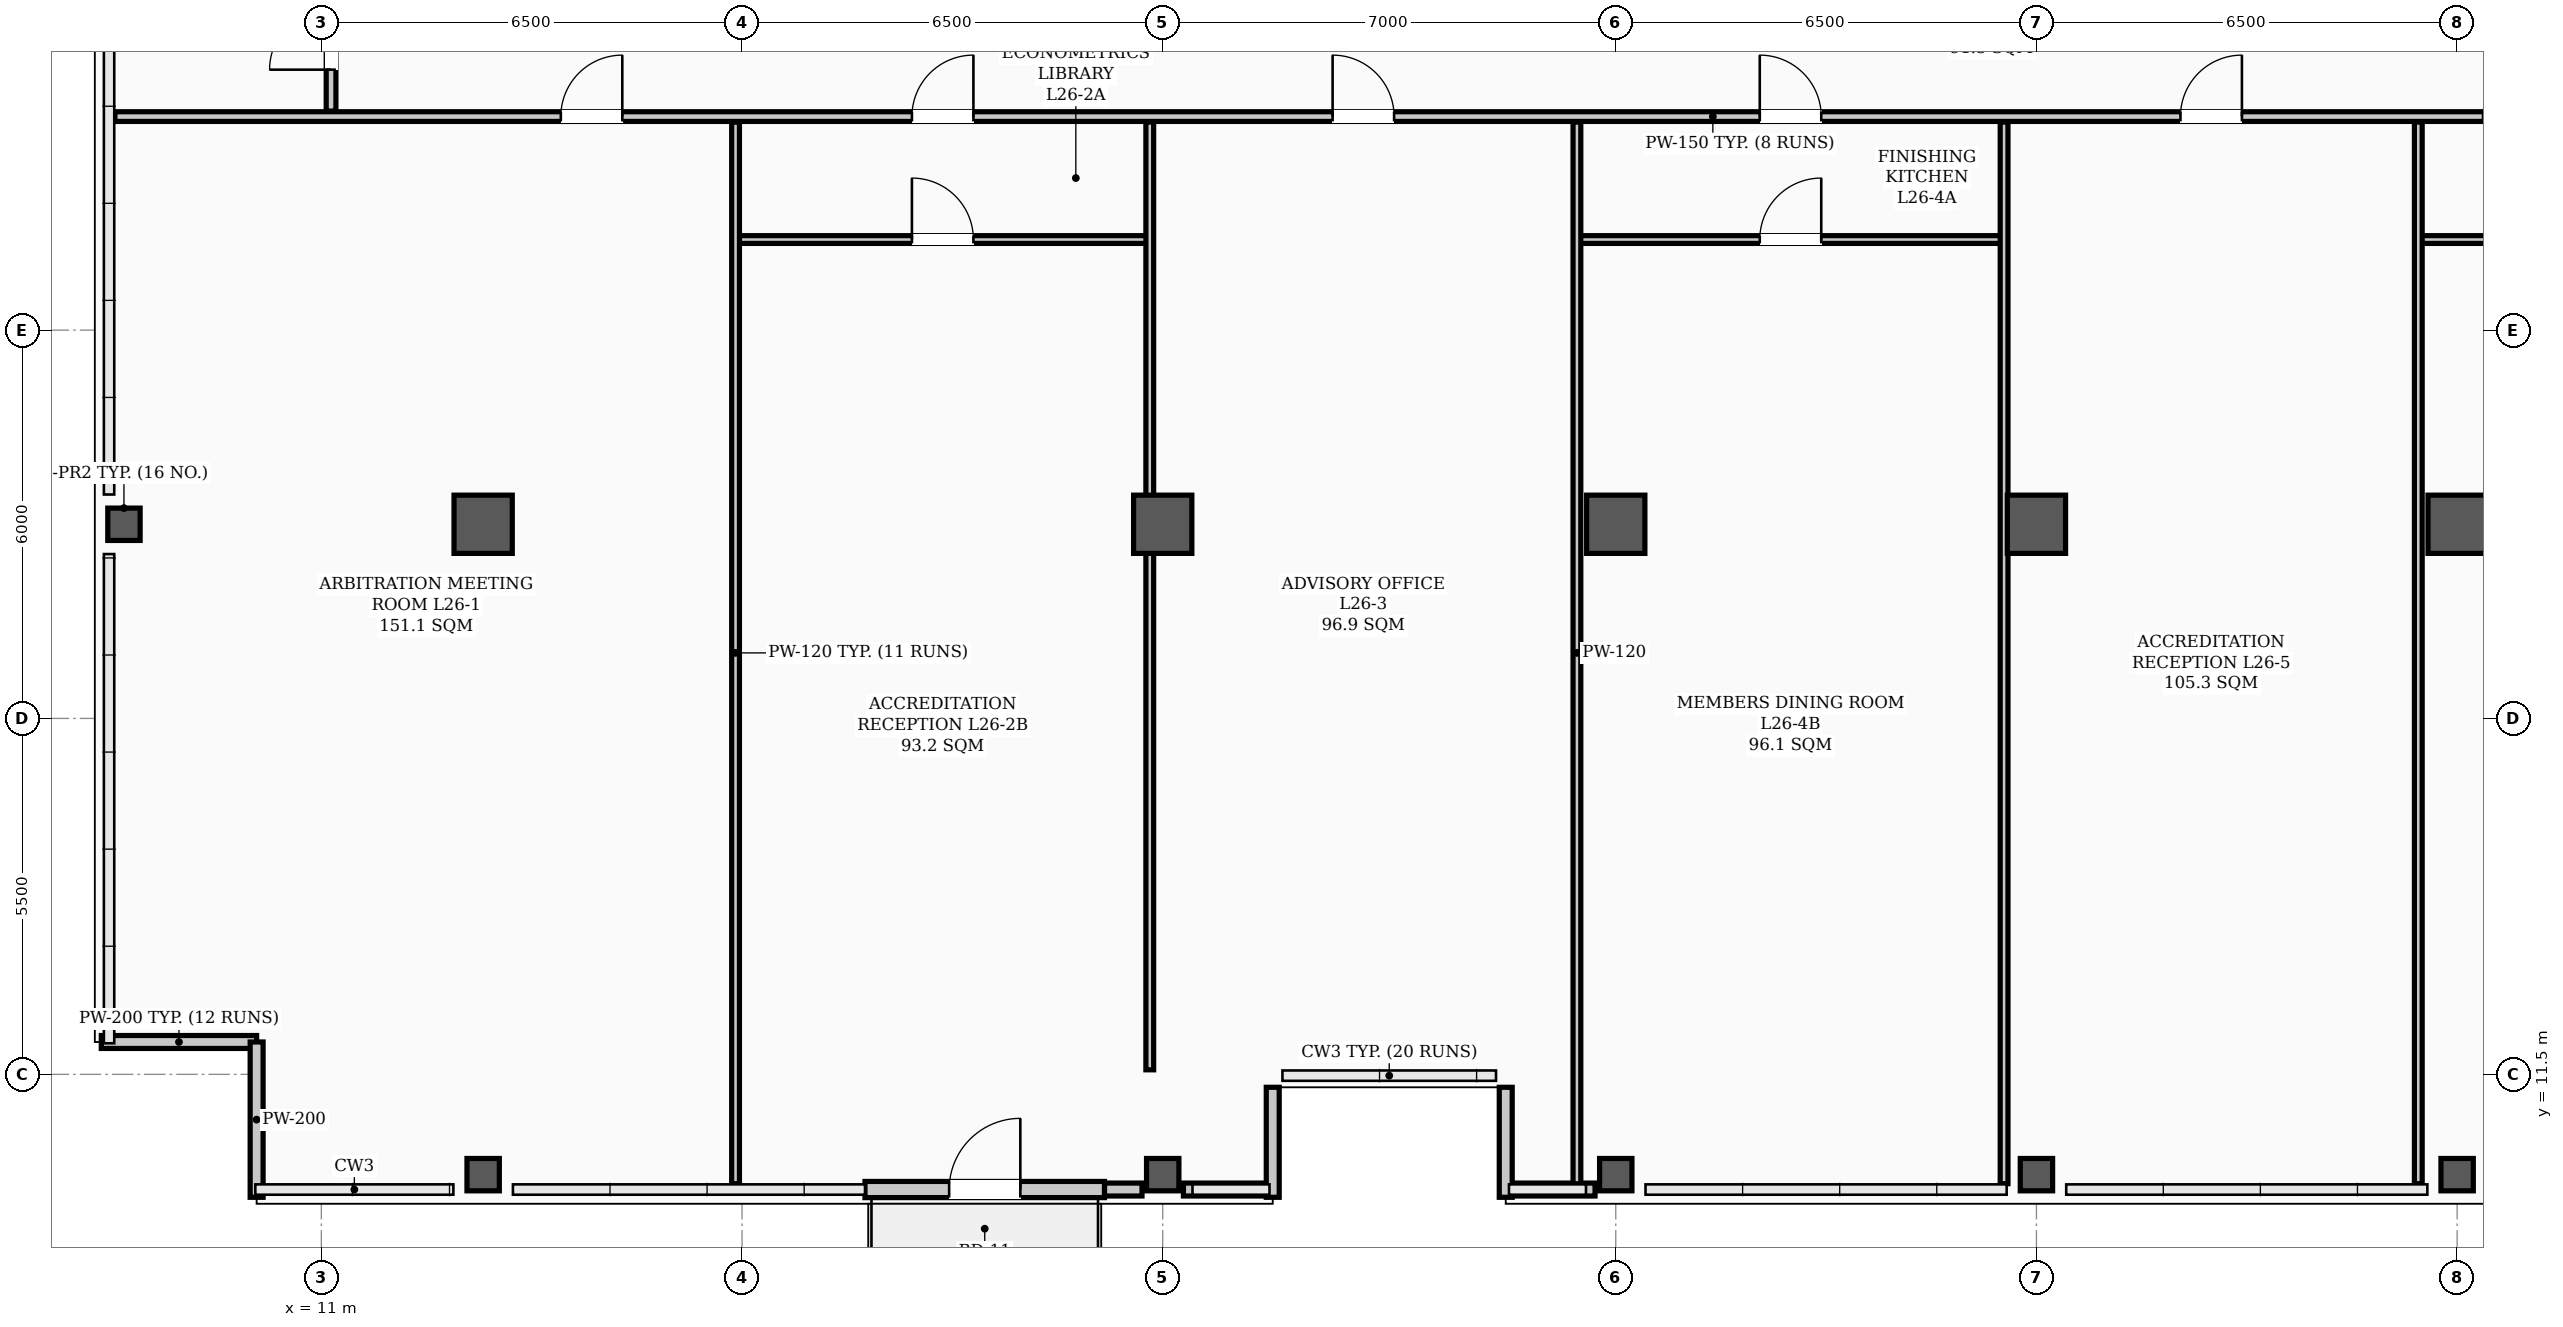
"""IFC4 building model, lengths in metres.
Left out: names, types, materials, properties, quantities, classifications, styles, units other than length and angle.
Written with IfcOpenShell. Run it as: python <this file> out.ifc"""

import sys

from ifc_helpers import new_model, si_unit, direction, frame, frame_2d, origin, origin_2d, place, context, subcontext, project, spatial, rectangle, hollow_rectangle, extrude, element, fill, save


model = new_model("IFC4")
c1 = context("Model", 3, precision=1e-05, world=origin(), true_north=direction((0.0, 1.0)))
c2 = subcontext(c1, "Body", "Model", "MODEL_VIEW")
j1 = project(units=[si_unit("LENGTHUNIT", "METRE"), si_unit("PLANEANGLEUNIT", "RADIAN")], contexts=[c1])
p1 = place(None, origin())
s1 = spatial("IfcSite", under=j1, at=p1, CompositionType="ELEMENT")
p2 = place(p1, origin())
s2 = spatial("IfcBuilding", under=s1, at=p2, CompositionType="ELEMENT")
p3 = place(p2, frame((0.0, 0.0, 106.0)))
s3 = spatial("IfcBuildingStorey", under=s2, at=p3, CompositionType="ELEMENT", Elevation=106.0)
for number, where, z_axis, x_axis in (
    (1, (13.5, 20.0, 0.0), (0.0, 0.0, 1.0), (1.0, 0.0, 0.0)),
    (2, (24.0, 20.0, 0.0), (0.0, 0.0, 1.0), (1.0, 0.0, 0.0)),
    (3, (31.0, 20.0, 0.0), (0.0, 0.0, 1.0), (1.0, 0.0, 0.0)),
    (4, (37.5, 20.0, 0.0), (0.0, 0.0, 1.0), (1.0, 0.0, 0.0)),
    (5, (44.0, 20.0, 0.0), (0.0, 0.0, 1.0), (1.0, 0.0, 0.0)),
):
    element("IfcColumn", number, at=place(p3, frame(where, z_axis=z_axis, x_axis=x_axis)), inside=s3, PredefinedType="COLUMN", context=c2, shape_type="SweptSolid", body=[
        extrude(hollow_rectangle(XDim=0.9, YDim=0.9, WallThickness=0.035, InnerFilletRadius=0.017, OuterFilletRadius=0.052, at=origin_2d()), origin(), (0.0, 0.0, 1.0), 5.0),
    ])
for number, where, z_axis, x_axis in (
    (6, (7.95, 20.0, 0.0), (0.0, 0.0, 1.0), (1.0, 0.0, 0.0)),
    (7, (13.5, 9.95, 0.0), (0.0, 0.0, 1.0), (1.0, 0.0, 0.0)),
    (8, (24.0, 9.95, 0.0), (0.0, 0.0, 1.0), (1.0, 0.0, 0.0)),
    (9, (31.0, 9.95, 0.0), (0.0, 0.0, 1.0), (1.0, 0.0, 0.0)),
    (10, (37.5, 9.95, 0.0), (0.0, 0.0, 1.0), (1.0, 0.0, 0.0)),
    (11, (44.0, 9.95, 0.0), (0.0, 0.0, 1.0), (1.0, 0.0, 0.0)),
):
    element("IfcColumn", number, at=place(p3, frame(where, z_axis=z_axis, x_axis=x_axis)), inside=s3, PredefinedType="COLUMN", context=c2, shape_type="SweptSolid", body=[
        extrude(hollow_rectangle(XDim=0.5, YDim=0.5, WallThickness=0.024, InnerFilletRadius=0.012, OuterFilletRadius=0.036, at=origin_2d()), origin(), (0.0, 0.0, 1.0), 5.0),
    ])
p4 = place(p3, frame((23.1, 9.72, 0.0), z_axis=(0.0, 0.0, 1.0), x_axis=(1.0, 0.0, 0.0)))
e12 = element("IfcWall", 12, at=p4, inside=s3, PredefinedType="PARAPET", context=c2, shape_type="SweptSolid", body=[
    extrude(rectangle(XDim=0.58, YDim=0.2, at=frame_2d((0.29, 0.0))), origin(), (0.0, 0.0, 1.0), 1.2),
])
for number, where, z_axis, x_axis in (
    (13, (24.32, 9.72, 0.0), (0.0, 0.0, 1.0), (1.0, 0.0, 0.0)),
    (14, (29.35, 9.72, 0.0), (0.0, 0.0, 1.0), (1.0, 0.0, 0.0)),
):
    element("IfcWall", number, at=place(p3, frame(where, z_axis=z_axis, x_axis=x_axis)), inside=s3, PredefinedType="PARAPET", context=c2, shape_type="SweptSolid", body=[
        extrude(rectangle(XDim=1.33, YDim=0.2, at=frame_2d((0.665, 0.0))), origin(), (0.0, 0.0, 1.0), 1.2),
    ])
for number, where, z_axis, x_axis in (
    (15, (7.6, 12.0, 0.0), (0.0, 0.0, 1.0), (1.0, 0.0, 0.0)),
    (16, (10.0, 12.0, 0.0), (0.0, 0.0, 1.0), (0.0, -1.0, 0.0)),
):
    element("IfcWall", number, at=place(p3, frame(where, z_axis=z_axis, x_axis=x_axis)), inside=s3, PredefinedType="PARAPET", context=c2, shape_type="SweptSolid", body=[
        extrude(rectangle(XDim=2.4, YDim=0.2, at=frame_2d((1.2, 0.0))), origin(), (0.0, 0.0, 1.0), 1.2),
    ])
for number, where, z_axis, x_axis in (
    (17, (25.7, 9.6, 0.0), (0.0, 0.0, 1.0), (0.0, 1.0, 0.0)),
    (18, (29.3, 11.3, 0.0), (0.0, 0.0, 1.0), (0.0, -1.0, 0.0)),
):
    element("IfcWall", number, at=place(p3, frame(where, z_axis=z_axis, x_axis=x_axis)), inside=s3, PredefinedType="PARAPET", context=c2, shape_type="SweptSolid", body=[
        extrude(rectangle(XDim=1.7, YDim=0.2, at=frame_2d((0.85, 0.0))), origin(), (0.0, 0.0, 1.0), 1.2),
    ])
p5 = place(p3, frame((19.4, 9.72, 0.0), z_axis=(0.0, 0.0, 1.0), x_axis=(1.0, 0.0, 0.0)))
e19 = element("IfcWall", 19, at=p5, inside=s3, PredefinedType="STANDARD", context=c2, shape_type="SweptSolid", body=[
    extrude(rectangle(XDim=3.7, YDim=0.25, at=frame_2d((1.85, 0.0))), origin(), (0.0, 0.0, 1.0), 4.28),
])
p6 = place(p5, frame((1.3, 0.0, 0.0)))
e20 = element("IfcOpeningElement", 20, at=p6, cuts=e19, PredefinedType="OPENING", context=c2, shape_type="SweptSolid", body=[
    extrude(rectangle(XDim=1.1, YDim=2.2, at=frame_2d((0.55, 1.1))), frame((0.0, 0.135, 0.0), z_axis=(0.0, -1.0, 0.0), x_axis=(1.0, 0.0, 0.0)), (0.0, 0.0, 1.0), 0.27),
])
p7 = place(p3, frame((7.81, 26.3, 0.0), z_axis=(0.0, 0.0, 1.0), x_axis=(1.0, 0.0, 0.0)))
e21 = element("IfcWall", 21, at=p7, inside=s3, PredefinedType="PARTITIONING", context=c2, shape_type="SweptSolid", body=[
    extrude(rectangle(XDim=49.38, YDim=0.15, at=frame_2d((24.69, 0.0))), origin(), (0.0, 0.0, 1.0), 4.2),
])
p8 = place(p7, frame((6.89, 0.0, 0.0)))
e22 = element("IfcOpeningElement", 22, at=p8, cuts=e21, PredefinedType="OPENING", context=c2, shape_type="SweptSolid", body=[
    extrude(rectangle(XDim=0.95, YDim=2.08, at=frame_2d((0.475, 1.04))), frame((0.0, 0.085, 0.0), z_axis=(0.0, -1.0, 0.0), x_axis=(1.0, 0.0, 0.0)), (0.0, 0.0, 1.0), 0.17),
])
p9 = place(p7, frame((12.315, 0.0, 0.0)))
e23 = element("IfcOpeningElement", 23, at=p9, cuts=e21, PredefinedType="OPENING", context=c2, shape_type="SweptSolid", body=[
    extrude(rectangle(XDim=0.95, YDim=2.08, at=frame_2d((0.475, 1.04))), frame((0.0, 0.085, 0.0), z_axis=(0.0, -1.0, 0.0), x_axis=(1.0, 0.0, 0.0)), (0.0, 0.0, 1.0), 0.17),
])
p10 = place(p7, frame((18.815, 0.0, 0.0)))
e24 = element("IfcOpeningElement", 24, at=p10, cuts=e21, PredefinedType="OPENING", context=c2, shape_type="SweptSolid", body=[
    extrude(rectangle(XDim=0.95, YDim=2.08, at=frame_2d((0.475, 1.04))), frame((0.0, 0.085, 0.0), z_axis=(0.0, -1.0, 0.0), x_axis=(1.0, 0.0, 0.0)), (0.0, 0.0, 1.0), 0.17),
])
p11 = place(p7, frame((25.415, 0.0, 0.0)))
e25 = element("IfcOpeningElement", 25, at=p11, cuts=e21, PredefinedType="OPENING", context=c2, shape_type="SweptSolid", body=[
    extrude(rectangle(XDim=0.95, YDim=2.08, at=frame_2d((0.475, 1.04))), frame((0.0, 0.085, 0.0), z_axis=(0.0, -1.0, 0.0), x_axis=(1.0, 0.0, 0.0)), (0.0, 0.0, 1.0), 0.17),
])
p12 = place(p7, frame((31.915, 0.0, 0.0)))
e26 = element("IfcOpeningElement", 26, at=p12, cuts=e21, PredefinedType="OPENING", context=c2, shape_type="SweptSolid", body=[
    extrude(rectangle(XDim=0.95, YDim=2.08, at=frame_2d((0.475, 1.04))), frame((0.0, 0.085, 0.0), z_axis=(0.0, -1.0, 0.0), x_axis=(1.0, 0.0, 0.0)), (0.0, 0.0, 1.0), 0.17),
])
p13 = place(p7, frame((36.59, 0.0, 0.0)))
e27 = element("IfcOpeningElement", 27, at=p13, cuts=e21, PredefinedType="OPENING", context=c2, shape_type="SweptSolid", body=[
    extrude(rectangle(XDim=0.95, YDim=2.08, at=frame_2d((0.475, 1.04))), frame((0.0, 0.085, 0.0), z_axis=(0.0, -1.0, 0.0), x_axis=(1.0, 0.0, 0.0)), (0.0, 0.0, 1.0), 0.17),
])
p14 = place(p3, frame((17.4, 24.4, 0.0), z_axis=(0.0, 0.0, 1.0), x_axis=(1.0, 0.0, 0.0)))
e28 = element("IfcWall", 28, at=p14, inside=s3, PredefinedType="PARTITIONING", context=c2, shape_type="SweptSolid", body=[
    extrude(rectangle(XDim=6.4, YDim=0.12, at=frame_2d((3.2, 0.0))), origin(), (0.0, 0.0, 1.0), 4.2),
])
p15 = place(p14, frame((2.725, 0.0, 0.0)))
e29 = element("IfcOpeningElement", 29, at=p15, cuts=e28, PredefinedType="OPENING", context=c2, shape_type="SweptSolid", body=[
    extrude(rectangle(XDim=0.95, YDim=2.08, at=frame_2d((0.475, 1.04))), frame((0.0, 0.07, 0.0), z_axis=(0.0, -1.0, 0.0), x_axis=(1.0, 0.0, 0.0)), (0.0, 0.0, 1.0), 0.14),
])
p16 = place(p3, frame((30.4, 24.4, 0.0), z_axis=(0.0, 0.0, 1.0), x_axis=(1.0, 0.0, 0.0)))
e30 = element("IfcWall", 30, at=p16, inside=s3, PredefinedType="PARTITIONING", context=c2, shape_type="SweptSolid", body=[
    extrude(rectangle(XDim=6.6, YDim=0.12, at=frame_2d((3.3, 0.0))), origin(), (0.0, 0.0, 1.0), 4.2),
])
p17 = place(p16, frame((2.825, 0.0, 0.0)))
e31 = element("IfcOpeningElement", 31, at=p17, cuts=e30, PredefinedType="OPENING", context=c2, shape_type="SweptSolid", body=[
    extrude(rectangle(XDim=0.95, YDim=2.08, at=frame_2d((0.475, 1.04))), frame((0.0, 0.07, 0.0), z_axis=(0.0, -1.0, 0.0), x_axis=(1.0, 0.0, 0.0)), (0.0, 0.0, 1.0), 0.14),
])
p18 = place(p3, frame((43.4, 24.4, 0.0), z_axis=(0.0, 0.0, 1.0), x_axis=(1.0, 0.0, 0.0)))
e32 = element("IfcWall", 32, at=p18, inside=s3, PredefinedType="PARTITIONING", context=c2, shape_type="SweptSolid", body=[
    extrude(rectangle(XDim=13.79, YDim=0.12, at=frame_2d((6.895, 0.0))), origin(), (0.0, 0.0, 1.0), 4.2),
])
p19 = place(p18, frame((6.42, 0.0, 0.0)))
e33 = element("IfcOpeningElement", 33, at=p19, cuts=e32, PredefinedType="OPENING", context=c2, shape_type="SweptSolid", body=[
    extrude(rectangle(XDim=0.95, YDim=2.08, at=frame_2d((0.475, 1.04))), frame((0.0, 0.07, 0.0), z_axis=(0.0, -1.0, 0.0), x_axis=(1.0, 0.0, 0.0)), (0.0, 0.0, 1.0), 0.14),
])
p20 = place(p3, frame((11.15, 26.385, 0.0), z_axis=(0.0, 0.0, 1.0), x_axis=(0.0, 1.0, 0.0)))
e34 = element("IfcWall", 34, at=p20, inside=s3, PredefinedType="PARTITIONING", context=c2, shape_type="SweptSolid", body=[
    extrude(rectangle(XDim=11.83, YDim=0.15, at=frame_2d((5.915, 0.0))), origin(), (0.0, 0.0, 1.0), 4.1),
])
p21 = place(p20, frame((0.64, 0.0, 0.0)))
e35 = element("IfcOpeningElement", 35, at=p21, cuts=e34, PredefinedType="OPENING", context=c2, shape_type="SweptSolid", body=[
    extrude(rectangle(XDim=0.95, YDim=2.08, at=frame_2d((0.475, 1.04))), frame((0.0, 0.085, 0.0), z_axis=(0.0, -1.0, 0.0), x_axis=(1.0, 0.0, 0.0)), (0.0, 0.0, 1.0), 0.17),
])
p22 = place(p20, frame((8.29, 0.0, 0.0)))
e36 = element("IfcOpeningElement", 36, at=p22, cuts=e34, PredefinedType="OPENING", context=c2, shape_type="SweptSolid", body=[
    extrude(rectangle(XDim=0.95, YDim=2.08, at=frame_2d((0.475, 1.04))), frame((0.0, 0.085, 0.0), z_axis=(0.0, -1.0, 0.0), x_axis=(1.0, 0.0, 0.0)), (0.0, 0.0, 1.0), 0.17),
])
p23 = place(p3, frame((17.4, 9.81, 0.0), z_axis=(0.0, 0.0, 1.0), x_axis=(0.0, 1.0, 0.0)))
e37 = element("IfcWall", 37, at=p23, inside=s3, PredefinedType="PARTITIONING", context=c2, shape_type="SweptSolid", body=[
    extrude(rectangle(XDim=16.405, YDim=0.12, at=frame_2d((8.203, 0.0))), origin(), (0.0, 0.0, 1.0), 4.1),
])
p24 = place(p3, frame((23.8, 11.57, 0.0), z_axis=(0.0, 0.0, 1.0), x_axis=(0.0, 1.0, 0.0)))
e38 = element("IfcWall", 38, at=p24, inside=s3, PredefinedType="PARTITIONING", context=c2, shape_type="SweptSolid", body=[
    extrude(rectangle(XDim=14.645, YDim=0.12, at=frame_2d((7.323, 0.0))), origin(), (0.0, 0.0, 1.0), 4.1),
])
for number, where, z_axis, x_axis in (
    (39, (30.4, 9.81, 0.0), (0.0, 0.0, 1.0), (0.0, 1.0, 0.0)),
    (40, (37.0, 9.81, 0.0), (0.0, 0.0, 1.0), (0.0, 1.0, 0.0)),
    (41, (43.4, 9.81, 0.0), (0.0, 0.0, 1.0), (0.0, 1.0, 0.0)),
):
    element("IfcWall", number, at=place(p3, frame(where, z_axis=z_axis, x_axis=x_axis)), inside=s3, PredefinedType="PARTITIONING", context=c2, shape_type="SweptSolid", body=[
        extrude(rectangle(XDim=16.405, YDim=0.12, at=frame_2d((8.203, 0.0))), origin(), (0.0, 0.0, 1.0), 4.1),
    ])
p25 = place(p6, origin())
e42 = element("IfcDoor", 42, at=p25, inside=s3, OperationType="SINGLE_SWING_RIGHT", PredefinedType="DOOR", context=c2, shape_type="SweptSolid", body=[
    extrude(rectangle(XDim=1.1, YDim=2.2, at=frame_2d((0.55, 1.1))), frame((0.0, 0.025, 0.0), z_axis=(0.0, -1.0, 0.0), x_axis=(1.0, 0.0, 0.0)), (0.0, 0.0, 1.0), 0.05),
])
fill(e20, e42)
p26 = place(p8, origin())
e43 = element("IfcDoor", 43, at=p26, inside=s3, OperationType="SINGLE_SWING_RIGHT", PredefinedType="DOOR", context=c2, shape_type="SweptSolid", body=[
    extrude(rectangle(XDim=0.95, YDim=2.08, at=frame_2d((0.475, 1.04))), frame((0.0, 0.025, 0.0), z_axis=(0.0, -1.0, 0.0), x_axis=(1.0, 0.0, 0.0)), (0.0, 0.0, 1.0), 0.05),
])
fill(e22, e43)
p27 = place(p15, origin())
e44 = element("IfcDoor", 44, at=p27, inside=s3, OperationType="SINGLE_SWING_LEFT", PredefinedType="DOOR", context=c2, shape_type="SweptSolid", body=[
    extrude(rectangle(XDim=0.95, YDim=2.08, at=frame_2d((0.475, 1.04))), frame((0.0, 0.025, 0.0), z_axis=(0.0, -1.0, 0.0), x_axis=(1.0, 0.0, 0.0)), (0.0, 0.0, 1.0), 0.05),
])
fill(e29, e44)
p28 = place(p9, origin())
e45 = element("IfcDoor", 45, at=p28, inside=s3, OperationType="SINGLE_SWING_RIGHT", PredefinedType="DOOR", context=c2, shape_type="SweptSolid", body=[
    extrude(rectangle(XDim=0.95, YDim=2.08, at=frame_2d((0.475, 1.04))), frame((0.0, 0.025, 0.0), z_axis=(0.0, -1.0, 0.0), x_axis=(1.0, 0.0, 0.0)), (0.0, 0.0, 1.0), 0.05),
])
fill(e23, e45)
p29 = place(p10, origin())
e46 = element("IfcDoor", 46, at=p29, inside=s3, OperationType="SINGLE_SWING_LEFT", PredefinedType="DOOR", context=c2, shape_type="SweptSolid", body=[
    extrude(rectangle(XDim=0.95, YDim=2.08, at=frame_2d((0.475, 1.04))), frame((0.0, 0.025, 0.0), z_axis=(0.0, -1.0, 0.0), x_axis=(1.0, 0.0, 0.0)), (0.0, 0.0, 1.0), 0.05),
])
fill(e24, e46)
p30 = place(p17, origin())
e47 = element("IfcDoor", 47, at=p30, inside=s3, OperationType="SINGLE_SWING_RIGHT", PredefinedType="DOOR", context=c2, shape_type="SweptSolid", body=[
    extrude(rectangle(XDim=0.95, YDim=2.08, at=frame_2d((0.475, 1.04))), frame((0.0, 0.025, 0.0), z_axis=(0.0, -1.0, 0.0), x_axis=(1.0, 0.0, 0.0)), (0.0, 0.0, 1.0), 0.05),
])
fill(e31, e47)
p31 = place(p11, origin())
e48 = element("IfcDoor", 48, at=p31, inside=s3, OperationType="SINGLE_SWING_LEFT", PredefinedType="DOOR", context=c2, shape_type="SweptSolid", body=[
    extrude(rectangle(XDim=0.95, YDim=2.08, at=frame_2d((0.475, 1.04))), frame((0.0, 0.025, 0.0), z_axis=(0.0, -1.0, 0.0), x_axis=(1.0, 0.0, 0.0)), (0.0, 0.0, 1.0), 0.05),
])
fill(e25, e48)
p32 = place(p12, origin())
e49 = element("IfcDoor", 49, at=p32, inside=s3, OperationType="SINGLE_SWING_RIGHT", PredefinedType="DOOR", context=c2, shape_type="SweptSolid", body=[
    extrude(rectangle(XDim=0.95, YDim=2.08, at=frame_2d((0.475, 1.04))), frame((0.0, 0.025, 0.0), z_axis=(0.0, -1.0, 0.0), x_axis=(1.0, 0.0, 0.0)), (0.0, 0.0, 1.0), 0.05),
])
fill(e26, e49)
p33 = place(p21, origin())
e50 = element("IfcDoor", 50, at=p33, inside=s3, OperationType="SINGLE_SWING_LEFT", PredefinedType="DOOR", context=c2, shape_type="SweptSolid", body=[
    extrude(rectangle(XDim=0.95, YDim=2.08, at=frame_2d((0.475, 1.04))), frame((0.0, 0.025, 0.0), z_axis=(0.0, -1.0, 0.0), x_axis=(1.0, 0.0, 0.0)), (0.0, 0.0, 1.0), 0.05),
])
fill(e35, e50)
save(model, sys.argv[1])
